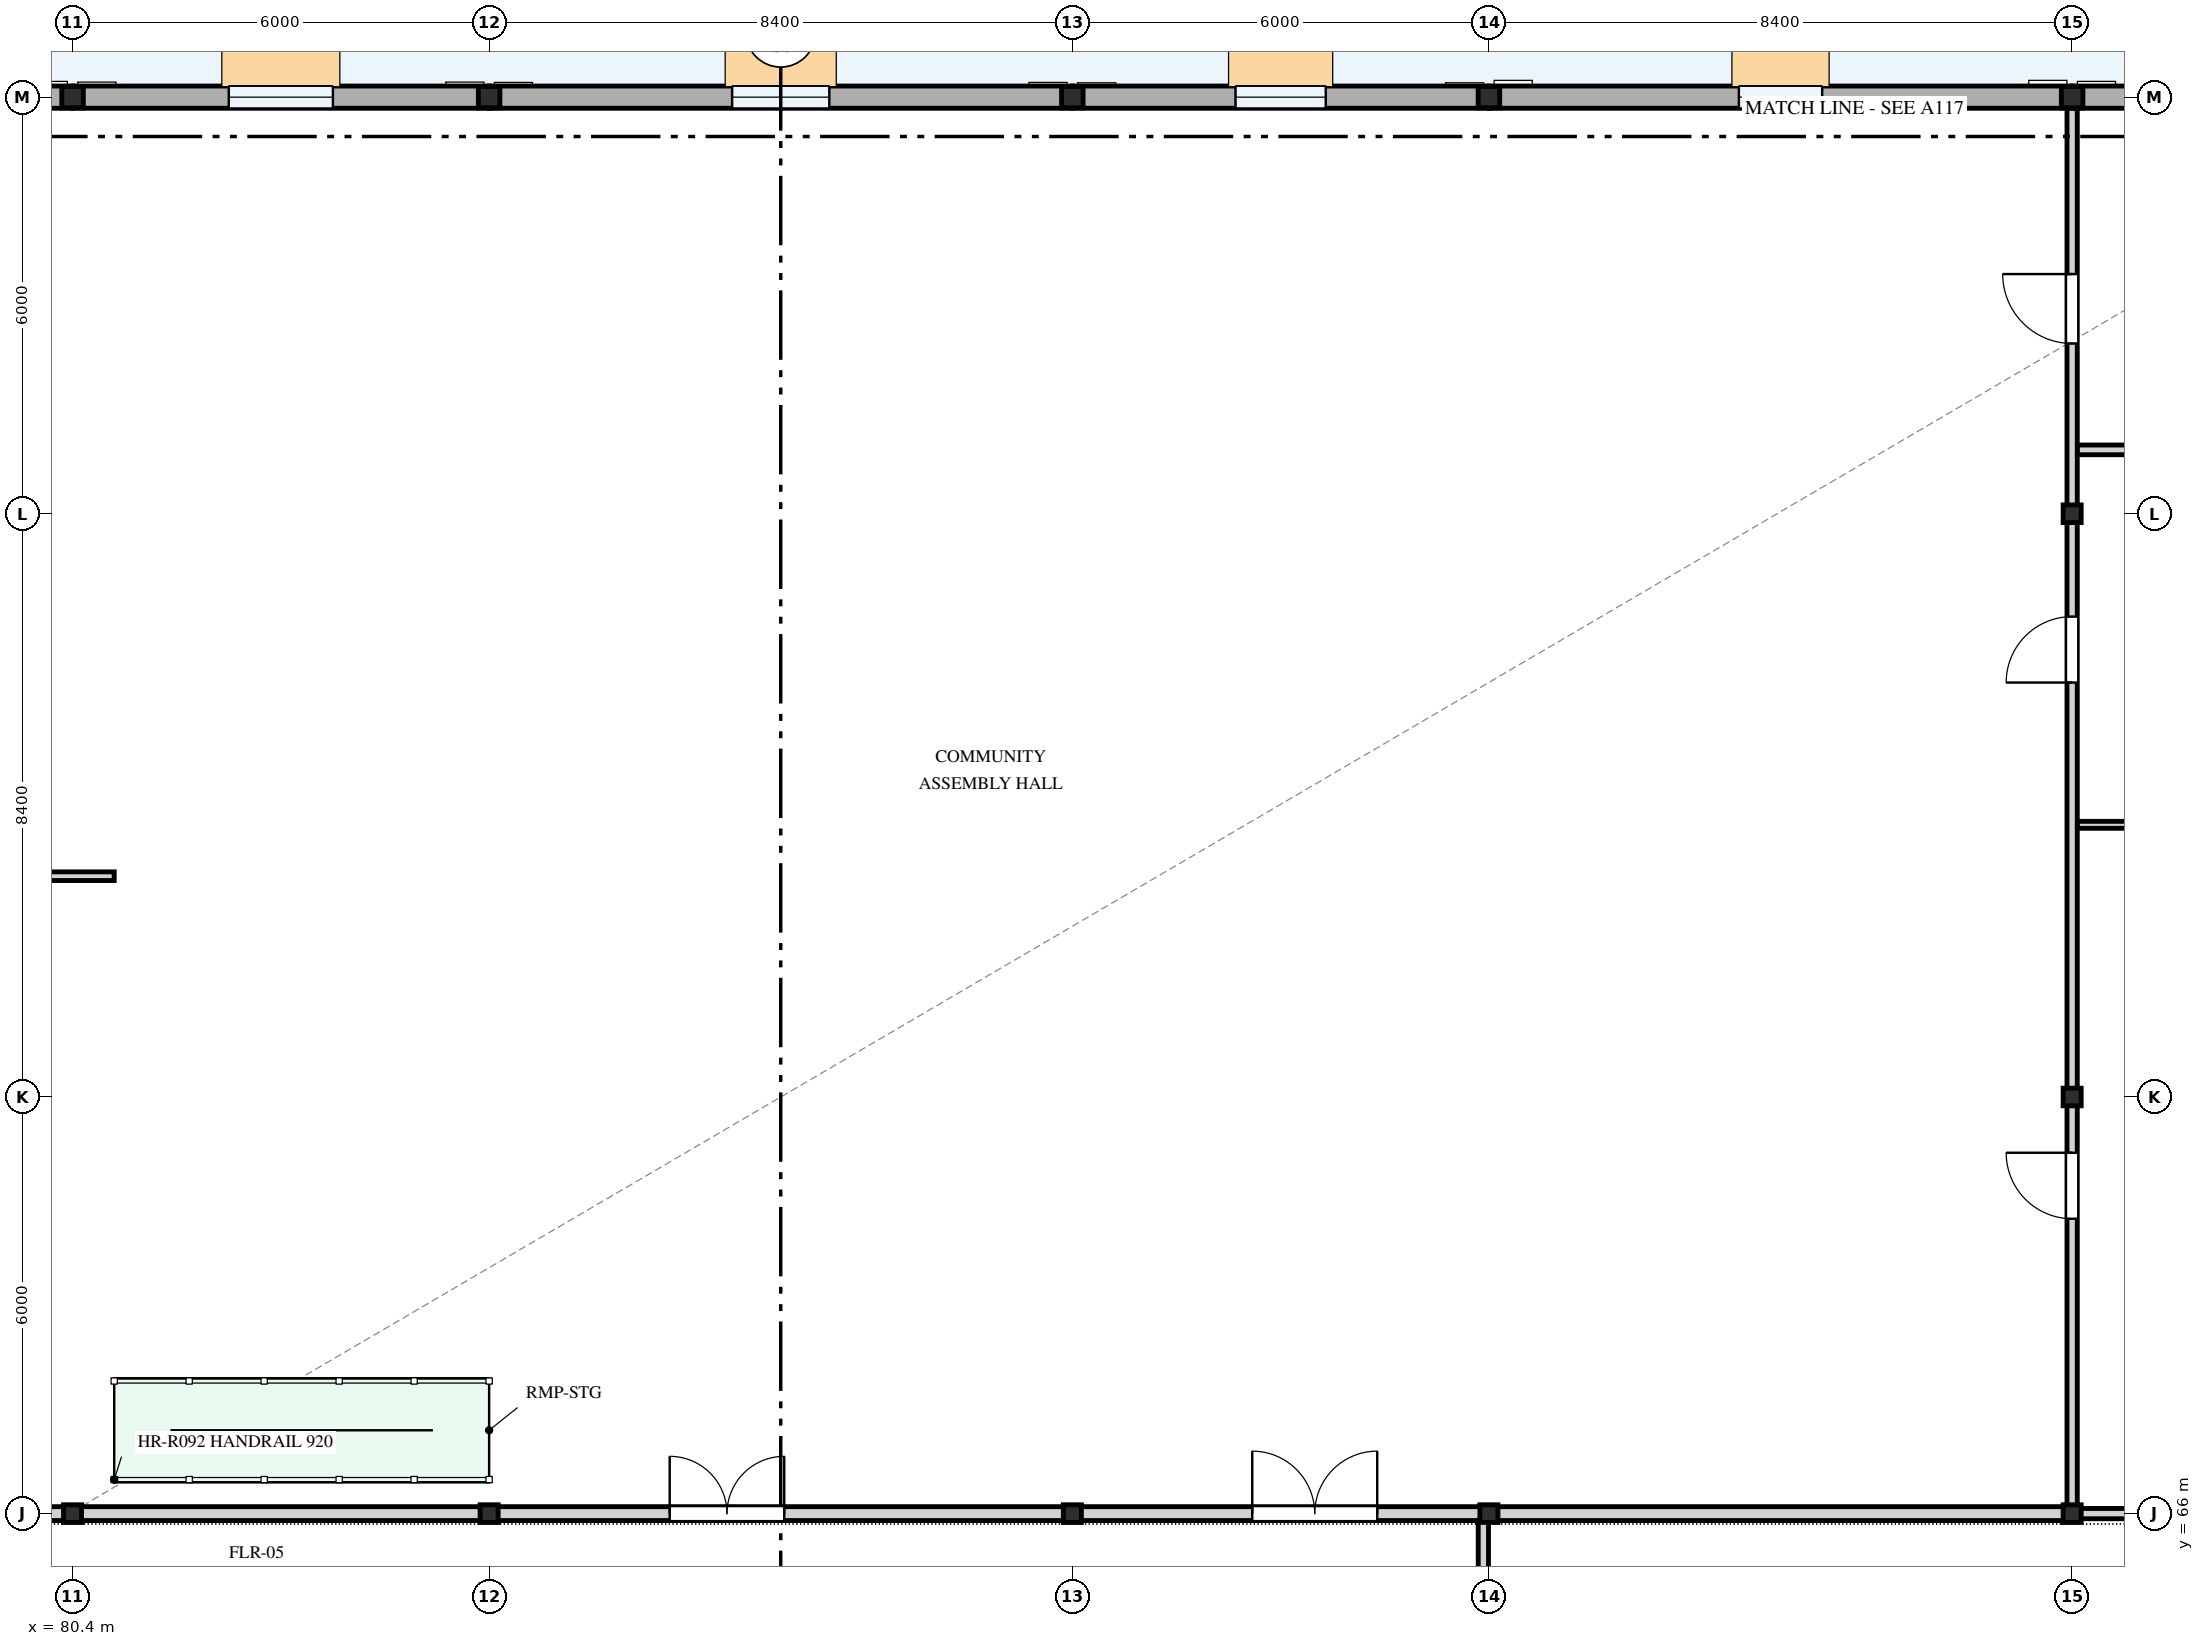
"""IFC4 building model, lengths in metres.
Left out: names, types, materials, properties, quantities, classifications, styles, units other than length and angle.
Written with IfcOpenShell. Run it as: python <this file> out.ifc"""

import sys

from ifc_helpers import new_model, si_unit, direction, frame, frame_2d, origin, origin_2d, place, context, subcontext, project, spatial, rectangle, i_section, extrude, element, fill, save


model = new_model("IFC4")
c1 = context("Model", 3, precision=1e-05, world=origin(), true_north=direction((0.0, 1.0)))
c2 = subcontext(c1, "Body", "Model", "MODEL_VIEW")
j1 = project(units=[si_unit("LENGTHUNIT", "METRE"), si_unit("PLANEANGLEUNIT", "RADIAN")], contexts=[c1])
p1 = place(None, origin())
s1 = spatial("IfcSite", under=j1, at=p1, CompositionType="ELEMENT")
p2 = place(p1, origin())
s2 = spatial("IfcBuilding", under=s1, at=p2, CompositionType="ELEMENT")
p3 = place(p2, origin())
s3 = spatial("IfcBuildingStorey", under=s2, at=p3, CompositionType="ELEMENT", Elevation=0.0)
p4 = place(p3, frame((80.4, 66.0, 0.0), z_axis=(0.0, 0.0, 1.0), x_axis=(1.0, 0.0, 0.0)))
e1 = element("IfcColumn", 1, at=p4, inside=s3, PredefinedType="COLUMN", context=c2, shape_type="SweptSolid", body=[
    extrude(i_section(OverallWidth=0.26, OverallDepth=0.254, WebThickness=0.014, FlangeThickness=0.014, FilletRadius=0.01, at=origin_2d()), origin(), (0.0, 0.0, 1.0), 4.5),
])
p5 = place(p3, frame((80.4, 86.4, 0.0), z_axis=(0.0, 0.0, 1.0), x_axis=(1.0, 0.0, 0.0)))
e2 = element("IfcColumn", 2, at=p5, inside=s3, PredefinedType="COLUMN", context=c2, shape_type="SweptSolid", body=[
    extrude(i_section(OverallWidth=0.31, OverallDepth=0.308, WebThickness=0.015, FlangeThickness=0.015, FilletRadius=0.012, at=origin_2d()), origin(), (0.0, 0.0, 1.0), 4.5),
])
p6 = place(p3, frame((86.4, 66.0, 0.0), z_axis=(0.0, 0.0, 1.0), x_axis=(1.0, 0.0, 0.0)))
e3 = element("IfcColumn", 3, at=p6, inside=s3, PredefinedType="COLUMN", context=c2, shape_type="SweptSolid", body=[
    extrude(i_section(OverallWidth=0.26, OverallDepth=0.254, WebThickness=0.014, FlangeThickness=0.014, FilletRadius=0.01, at=origin_2d()), origin(), (0.0, 0.0, 1.0), 4.5),
])
p7 = place(p3, frame((86.4, 86.4, 0.0), z_axis=(0.0, 0.0, 1.0), x_axis=(1.0, 0.0, 0.0)))
e4 = element("IfcColumn", 4, at=p7, inside=s3, PredefinedType="COLUMN", context=c2, shape_type="SweptSolid", body=[
    extrude(i_section(OverallWidth=0.31, OverallDepth=0.308, WebThickness=0.015, FlangeThickness=0.015, FilletRadius=0.012, at=origin_2d()), origin(), (0.0, 0.0, 1.0), 4.5),
])
p8 = place(p3, frame((94.8, 66.0, 0.0), z_axis=(0.0, 0.0, 1.0), x_axis=(1.0, 0.0, 0.0)))
e5 = element("IfcColumn", 5, at=p8, inside=s3, PredefinedType="COLUMN", context=c2, shape_type="SweptSolid", body=[
    extrude(i_section(OverallWidth=0.26, OverallDepth=0.254, WebThickness=0.014, FlangeThickness=0.014, FilletRadius=0.01, at=origin_2d()), origin(), (0.0, 0.0, 1.0), 4.5),
])
p9 = place(p3, frame((94.8, 86.4, 0.0), z_axis=(0.0, 0.0, 1.0), x_axis=(1.0, 0.0, 0.0)))
e6 = element("IfcColumn", 6, at=p9, inside=s3, PredefinedType="COLUMN", context=c2, shape_type="SweptSolid", body=[
    extrude(i_section(OverallWidth=0.31, OverallDepth=0.308, WebThickness=0.015, FlangeThickness=0.015, FilletRadius=0.012, at=origin_2d()), origin(), (0.0, 0.0, 1.0), 4.5),
])
p10 = place(p3, frame((100.8, 66.0, 0.0), z_axis=(0.0, 0.0, 1.0), x_axis=(1.0, 0.0, 0.0)))
e7 = element("IfcColumn", 7, at=p10, inside=s3, PredefinedType="COLUMN", context=c2, shape_type="SweptSolid", body=[
    extrude(i_section(OverallWidth=0.26, OverallDepth=0.254, WebThickness=0.014, FlangeThickness=0.014, FilletRadius=0.01, at=origin_2d()), origin(), (0.0, 0.0, 1.0), 4.5),
])
p11 = place(p3, frame((100.8, 86.4, 0.0), z_axis=(0.0, 0.0, 1.0), x_axis=(1.0, 0.0, 0.0)))
e8 = element("IfcColumn", 8, at=p11, inside=s3, PredefinedType="COLUMN", context=c2, shape_type="SweptSolid", body=[
    extrude(i_section(OverallWidth=0.31, OverallDepth=0.308, WebThickness=0.015, FlangeThickness=0.015, FilletRadius=0.012, at=origin_2d()), origin(), (0.0, 0.0, 1.0), 4.5),
])
for number, where, z_axis, x_axis in (
    (9, (109.2, 66.0, 0.0), (0.0, 0.0, 1.0), (1.0, 0.0, 0.0)),
    (10, (109.2, 72.0, 0.0), (0.0, 0.0, 1.0), (1.0, 0.0, 0.0)),
    (11, (109.2, 80.4, 0.0), (0.0, 0.0, 1.0), (1.0, 0.0, 0.0)),
):
    element("IfcColumn", number, at=place(p3, frame(where, z_axis=z_axis, x_axis=x_axis)), inside=s3, PredefinedType="COLUMN", context=c2, shape_type="SweptSolid", body=[
        extrude(i_section(OverallWidth=0.26, OverallDepth=0.254, WebThickness=0.014, FlangeThickness=0.014, FilletRadius=0.01, at=origin_2d()), origin(), (0.0, 0.0, 1.0), 4.5),
    ])
p12 = place(p3, frame((109.2, 86.4, 0.0), z_axis=(0.0, 0.0, 1.0), x_axis=(1.0, 0.0, 0.0)))
e12 = element("IfcColumn", 12, at=p12, inside=s3, PredefinedType="COLUMN", context=c2, shape_type="SweptSolid", body=[
    extrude(i_section(OverallWidth=0.31, OverallDepth=0.308, WebThickness=0.015, FlangeThickness=0.015, FilletRadius=0.012, at=origin_2d()), origin(), (0.0, 0.0, 1.0), 4.5),
])
p13 = place(p3, frame((115.2, 86.4, 0.0), z_axis=(0.0, 0.0, 1.0), x_axis=(-1.0, 0.0, 0.0)))
e13 = element("IfcWall", 13, at=p13, inside=s3, PredefinedType="STANDARD", context=c2, shape_type="SweptSolid", body=[
    extrude(rectangle(XDim=6.0, YDim=0.32, at=frame_2d((3.0, 0.0))), origin(), (0.0, 0.0, 1.0), 3.722),
])
p14 = place(p13, frame((2.4, 0.0, 0.85)))
e14 = element("IfcOpeningElement", 14, at=p14, cuts=e13, PredefinedType="OPENING", context=c2, shape_type="SweptSolid", body=[
    extrude(rectangle(XDim=1.2, YDim=1.35, at=frame_2d((0.6, 0.675))), frame((0.0, 0.17, 0.0), z_axis=(0.0, -1.0, 0.0), x_axis=(1.0, 0.0, 0.0)), (0.0, 0.0, 1.0), 0.34),
])
p15 = place(p3, frame((109.2, 86.4, 0.0), z_axis=(0.0, 0.0, 1.0), x_axis=(-1.0, 0.0, 0.0)))
e15 = element("IfcWall", 15, at=p15, inside=s3, PredefinedType="STANDARD", context=c2, shape_type="SweptSolid", body=[
    extrude(rectangle(XDim=8.4, YDim=0.32, at=frame_2d((4.2, 0.0))), origin(), (0.0, 0.0, 1.0), 3.646),
])
p16 = place(p15, frame((3.6, 0.0, 0.85)))
e16 = element("IfcOpeningElement", 16, at=p16, cuts=e15, PredefinedType="OPENING", context=c2, shape_type="SweptSolid", body=[
    extrude(rectangle(XDim=1.2, YDim=1.5, at=frame_2d((0.6, 0.75))), frame((0.0, 0.17, 0.0), z_axis=(0.0, -1.0, 0.0), x_axis=(1.0, 0.0, 0.0)), (0.0, 0.0, 1.0), 0.34),
])
p17 = place(p3, frame((100.8, 86.4, 0.0), z_axis=(0.0, 0.0, 1.0), x_axis=(-1.0, 0.0, 0.0)))
e17 = element("IfcWall", 17, at=p17, inside=s3, PredefinedType="STANDARD", context=c2, shape_type="SweptSolid", body=[
    extrude(rectangle(XDim=6.0, YDim=0.32, at=frame_2d((3.0, 0.0))), origin(), (0.0, 0.0, 1.0), 3.722),
])
p18 = place(p17, frame((2.35, 0.0, 0.85)))
e18 = element("IfcOpeningElement", 18, at=p18, cuts=e17, PredefinedType="OPENING", context=c2, shape_type="SweptSolid", body=[
    extrude(rectangle(XDim=1.3, YDim=1.4, at=frame_2d((0.65, 0.7))), frame((0.0, 0.17, 0.0), z_axis=(0.0, -1.0, 0.0), x_axis=(1.0, 0.0, 0.0)), (0.0, 0.0, 1.0), 0.34),
])
p19 = place(p3, frame((94.8, 86.4, 0.0), z_axis=(0.0, 0.0, 1.0), x_axis=(-1.0, 0.0, 0.0)))
e19 = element("IfcWall", 19, at=p19, inside=s3, PredefinedType="STANDARD", context=c2, shape_type="SweptSolid", body=[
    extrude(rectangle(XDim=8.4, YDim=0.32, at=frame_2d((4.2, 0.0))), origin(), (0.0, 0.0, 1.0), 3.646),
])
p20 = place(p19, frame((3.5, 0.0, 0.85)))
e20 = element("IfcOpeningElement", 20, at=p20, cuts=e19, PredefinedType="OPENING", context=c2, shape_type="SweptSolid", body=[
    extrude(rectangle(XDim=1.4, YDim=1.45, at=frame_2d((0.7, 0.725))), frame((0.0, 0.17, 0.0), z_axis=(0.0, -1.0, 0.0), x_axis=(1.0, 0.0, 0.0)), (0.0, 0.0, 1.0), 0.34),
])
p21 = place(p3, frame((86.4, 86.4, 0.0), z_axis=(0.0, 0.0, 1.0), x_axis=(-1.0, 0.0, 0.0)))
e21 = element("IfcWall", 21, at=p21, inside=s3, PredefinedType="STANDARD", context=c2, shape_type="SweptSolid", body=[
    extrude(rectangle(XDim=6.0, YDim=0.32, at=frame_2d((3.0, 0.0))), origin(), (0.0, 0.0, 1.0), 3.722),
])
p22 = place(p21, frame((2.25, 0.0, 0.85)))
e22 = element("IfcOpeningElement", 22, at=p22, cuts=e21, PredefinedType="OPENING", context=c2, shape_type="SweptSolid", body=[
    extrude(rectangle(XDim=1.5, YDim=1.5, at=frame_2d((0.75, 0.75))), frame((0.0, 0.17, 0.0), z_axis=(0.0, -1.0, 0.0), x_axis=(1.0, 0.0, 0.0)), (0.0, 0.0, 1.0), 0.34),
])
p23 = place(p3, frame((80.4, 86.4, 0.0), z_axis=(0.0, 0.0, 1.0), x_axis=(-1.0, 0.0, 0.0)))
e23 = element("IfcWall", 23, at=p23, inside=s3, PredefinedType="STANDARD", context=c2, shape_type="SweptSolid", body=[
    extrude(rectangle(XDim=8.4, YDim=0.32, at=frame_2d((4.2, 0.0))), origin(), (0.0, 0.0, 1.0), 3.646),
])
p24 = place(p23, frame((3.425, 0.0, 0.85)))
e24 = element("IfcOpeningElement", 24, at=p24, cuts=e23, PredefinedType="OPENING", context=c2, shape_type="SweptSolid", body=[
    extrude(rectangle(XDim=1.55, YDim=1.4, at=frame_2d((0.775, 0.7))), frame((0.0, 0.17, 0.0), z_axis=(0.0, -1.0, 0.0), x_axis=(1.0, 0.0, 0.0)), (0.0, 0.0, 1.0), 0.34),
])
p25 = place(p3, frame((72.0, 66.0, 0.0), z_axis=(0.0, 0.0, 1.0), x_axis=(1.0, 0.0, 0.0)))
e25 = element("IfcWall", 25, at=p25, inside=s3, PredefinedType="PARTITIONING", context=c2, shape_type="SweptSolid", body=[
    extrude(rectangle(XDim=37.2, YDim=0.2, at=frame_2d((18.6, 0.0))), origin(), (0.0, 0.0, 1.0), 3.266),
])
p26 = place(p25, frame((17.001, 0.0, 0.0)))
e26 = element("IfcOpeningElement", 26, at=p26, cuts=e25, PredefinedType="OPENING", context=c2, shape_type="SweptSolid", body=[
    extrude(rectangle(XDim=1.65, YDim=2.3, at=frame_2d((0.825, 1.15))), frame((0.0, 0.11, 0.0), z_axis=(0.0, -1.0, 0.0), x_axis=(1.0, 0.0, 0.0)), (0.0, 0.0, 1.0), 0.22),
])
p27 = place(p25, frame((25.391, 0.0, 0.0)))
e27 = element("IfcOpeningElement", 27, at=p27, cuts=e25, PredefinedType="OPENING", context=c2, shape_type="SweptSolid", body=[
    extrude(rectangle(XDim=1.8, YDim=2.4, at=frame_2d((0.9, 1.2))), frame((0.0, 0.11, 0.0), z_axis=(0.0, -1.0, 0.0), x_axis=(1.0, 0.0, 0.0)), (0.0, 0.0, 1.0), 0.22),
])
p28 = place(p3, frame((109.2, 66.102, 0.0), z_axis=(0.0, 0.0, 1.0), x_axis=(0.0, 1.0, 0.0)))
e28 = element("IfcWall", 28, at=p28, inside=s3, PredefinedType="PARTITIONING", context=c2, shape_type="SweptSolid", body=[
    extrude(rectangle(XDim=20.136, YDim=0.148, at=frame_2d((10.068, 0.0))), origin(), (0.0, 0.0, 1.0), 3.65),
])
p29 = place(p28, frame((4.145, 0.0, 0.0)))
e29 = element("IfcOpeningElement", 29, at=p29, cuts=e28, PredefinedType="OPENING", context=c2, shape_type="SweptSolid", body=[
    extrude(rectangle(XDim=0.95, YDim=2.1, at=frame_2d((0.475, 1.05))), frame((0.0, 0.084, 0.0), z_axis=(0.0, -1.0, 0.0), x_axis=(1.0, 0.0, 0.0)), (0.0, 0.0, 1.0), 0.168),
])
p30 = place(p28, frame((11.867, 0.0, 0.0)))
e30 = element("IfcOpeningElement", 30, at=p30, cuts=e28, PredefinedType="OPENING", context=c2, shape_type="SweptSolid", body=[
    extrude(rectangle(XDim=0.95, YDim=2.1, at=frame_2d((0.475, 1.05))), frame((0.0, 0.084, 0.0), z_axis=(0.0, -1.0, 0.0), x_axis=(1.0, 0.0, 0.0)), (0.0, 0.0, 1.0), 0.168),
])
p31 = place(p28, frame((16.75, 0.0, 0.0)))
e31 = element("IfcOpeningElement", 31, at=p31, cuts=e28, PredefinedType="OPENING", context=c2, shape_type="SweptSolid", body=[
    extrude(rectangle(XDim=1.0, YDim=2.1, at=frame_2d((0.5, 1.05))), frame((0.0, 0.084, 0.0), z_axis=(0.0, -1.0, 0.0), x_axis=(1.0, 0.0, 0.0)), (0.0, 0.0, 1.0), 0.168),
])
p32 = place(p3, frame((109.2, 66.0, 0.0), z_axis=(0.0, 0.0, 1.0), x_axis=(1.0, 0.0, 0.0)))
e32 = element("IfcWall", 32, at=p32, inside=s3, PredefinedType="PARTITIONING", context=c2, shape_type="SweptSolid", body=[
    extrude(rectangle(XDim=5.86, YDim=0.148, at=frame_2d((2.93, 0.0))), origin(), (0.0, 0.0, 1.0), 3.722),
])
p33 = place(p3, frame((109.276, 75.92, 0.0), z_axis=(0.0, 0.0, 1.0), x_axis=(1.0, 0.0, 0.0)))
e33 = element("IfcWall", 33, at=p33, inside=s3, PredefinedType="PARTITIONING", context=c2, shape_type="SweptSolid", body=[
    extrude(rectangle(XDim=5.784, YDim=0.1, at=frame_2d((2.892, 0.0))), origin(), (0.0, 0.0, 1.0), 4.2),
])
p34 = place(p3, frame((109.276, 81.32, 0.0), z_axis=(0.0, 0.0, 1.0), x_axis=(1.0, 0.0, 0.0)))
e34 = element("IfcWall", 34, at=p34, inside=s3, PredefinedType="PARTITIONING", context=c2, shape_type="SweptSolid", body=[
    extrude(rectangle(XDim=5.784, YDim=0.14, at=frame_2d((2.892, 0.0))), origin(), (0.0, 0.0, 1.0), 4.2),
])
p35 = place(p3, frame((72.076, 75.18, 0.0), z_axis=(0.0, 0.0, 1.0), x_axis=(1.0, 0.0, 0.0)))
e35 = element("IfcWall", 35, at=p35, inside=s3, PredefinedType="PARTITIONING", context=c2, shape_type="SweptSolid", body=[
    extrude(rectangle(XDim=8.924, YDim=0.125, at=frame_2d((4.462, 0.0))), origin(), (0.0, 0.0, 1.0), 4.2),
])
p36 = place(p3, frame((100.72, 57.762, 0.0), z_axis=(0.0, 0.0, 1.0), x_axis=(0.0, 1.0, 0.0)))
e36 = element("IfcWall", 36, at=p36, inside=s3, PredefinedType="PARTITIONING", context=c2, shape_type="SweptSolid", body=[
    extrude(rectangle(XDim=8.136, YDim=0.148, at=frame_2d((4.068, 0.0))), origin(), (0.0, 0.0, 1.0), 3.65),
])
p37 = place(p36, frame((3.568, 0.0, 0.0)))
e37 = element("IfcOpeningElement", 37, at=p37, cuts=e36, PredefinedType="OPENING", context=c2, shape_type="SweptSolid", body=[
    extrude(rectangle(XDim=1.0, YDim=2.15, at=frame_2d((0.5, 1.075))), frame((0.0, 0.084, 0.0), z_axis=(0.0, -1.0, 0.0), x_axis=(1.0, 0.0, 0.0)), (0.0, 0.0, 1.0), 0.168),
])
p38 = place(p16, origin())
e38 = element("IfcWindow", 38, at=p38, inside=s3, PartitioningType="SINGLE_PANEL", PredefinedType="WINDOW", context=c2, shape_type="SweptSolid", body=[
    extrude(rectangle(XDim=1.2, YDim=1.5, at=frame_2d((0.6, 0.75))), frame((0.0, 0.03, 0.0), z_axis=(0.0, -1.0, 0.0), x_axis=(1.0, 0.0, 0.0)), (0.0, 0.0, 1.0), 0.06),
])
fill(e16, e38)
p39 = place(p18, origin())
e39 = element("IfcWindow", 39, at=p39, inside=s3, PartitioningType="SINGLE_PANEL", PredefinedType="WINDOW", context=c2, shape_type="SweptSolid", body=[
    extrude(rectangle(XDim=1.3, YDim=1.4, at=frame_2d((0.65, 0.7))), frame((0.0, 0.03, 0.0), z_axis=(0.0, -1.0, 0.0), x_axis=(1.0, 0.0, 0.0)), (0.0, 0.0, 1.0), 0.06),
])
fill(e18, e39)
p40 = place(p20, origin())
e40 = element("IfcWindow", 40, at=p40, inside=s3, PartitioningType="SINGLE_PANEL", PredefinedType="WINDOW", context=c2, shape_type="SweptSolid", body=[
    extrude(rectangle(XDim=1.4, YDim=1.45, at=frame_2d((0.7, 0.725))), frame((0.0, 0.03, 0.0), z_axis=(0.0, -1.0, 0.0), x_axis=(1.0, 0.0, 0.0)), (0.0, 0.0, 1.0), 0.06),
])
fill(e20, e40)
p41 = place(p22, origin())
e41 = element("IfcWindow", 41, at=p41, inside=s3, PartitioningType="SINGLE_PANEL", PredefinedType="WINDOW", context=c2, shape_type="SweptSolid", body=[
    extrude(rectangle(XDim=1.5, YDim=1.5, at=frame_2d((0.75, 0.75))), frame((0.0, 0.03, 0.0), z_axis=(0.0, -1.0, 0.0), x_axis=(1.0, 0.0, 0.0)), (0.0, 0.0, 1.0), 0.06),
])
fill(e22, e41)
p42 = place(p26, origin())
e42 = element("IfcDoor", 42, at=p42, inside=s3, OperationType="DOUBLE_DOOR_SINGLE_SWING", PredefinedType="DOOR", context=c2, shape_type="SweptSolid", body=[
    extrude(rectangle(XDim=1.65, YDim=2.3, at=frame_2d((0.825, 1.15))), frame((0.0, 0.025, 0.0), z_axis=(0.0, -1.0, 0.0), x_axis=(1.0, 0.0, 0.0)), (0.0, 0.0, 1.0), 0.05),
])
fill(e26, e42)
p43 = place(p27, origin())
e43 = element("IfcDoor", 43, at=p43, inside=s3, OperationType="DOUBLE_DOOR_SINGLE_SWING", PredefinedType="DOOR", context=c2, shape_type="SweptSolid", body=[
    extrude(rectangle(XDim=1.8, YDim=2.4, at=frame_2d((0.9, 1.2))), frame((0.0, 0.025, 0.0), z_axis=(0.0, -1.0, 0.0), x_axis=(1.0, 0.0, 0.0)), (0.0, 0.0, 1.0), 0.05),
])
fill(e27, e43)
p44 = place(p29, origin())
e44 = element("IfcDoor", 44, at=p44, inside=s3, OperationType="SINGLE_SWING_RIGHT", PredefinedType="DOOR", context=c2, shape_type="SweptSolid", body=[
    extrude(rectangle(XDim=0.95, YDim=2.1, at=frame_2d((0.475, 1.05))), frame((0.0, 0.025, 0.0), z_axis=(0.0, -1.0, 0.0), x_axis=(1.0, 0.0, 0.0)), (0.0, 0.0, 1.0), 0.05),
])
fill(e29, e44)
p45 = place(p30, origin())
e45 = element("IfcDoor", 45, at=p45, inside=s3, OperationType="SINGLE_SWING_LEFT", PredefinedType="DOOR", context=c2, shape_type="SweptSolid", body=[
    extrude(rectangle(XDim=0.95, YDim=2.1, at=frame_2d((0.475, 1.05))), frame((0.0, 0.025, 0.0), z_axis=(0.0, -1.0, 0.0), x_axis=(1.0, 0.0, 0.0)), (0.0, 0.0, 1.0), 0.05),
])
fill(e30, e45)
p46 = place(p31, origin())
e46 = element("IfcDoor", 46, at=p46, inside=s3, OperationType="SINGLE_SWING_RIGHT", PredefinedType="DOOR", context=c2, shape_type="SweptSolid", body=[
    extrude(rectangle(XDim=1.0, YDim=2.1, at=frame_2d((0.5, 1.05))), frame((0.0, 0.025, 0.0), z_axis=(0.0, -1.0, 0.0), x_axis=(1.0, 0.0, 0.0)), (0.0, 0.0, 1.0), 0.05),
])
fill(e31, e46)
save(model, sys.argv[1])
